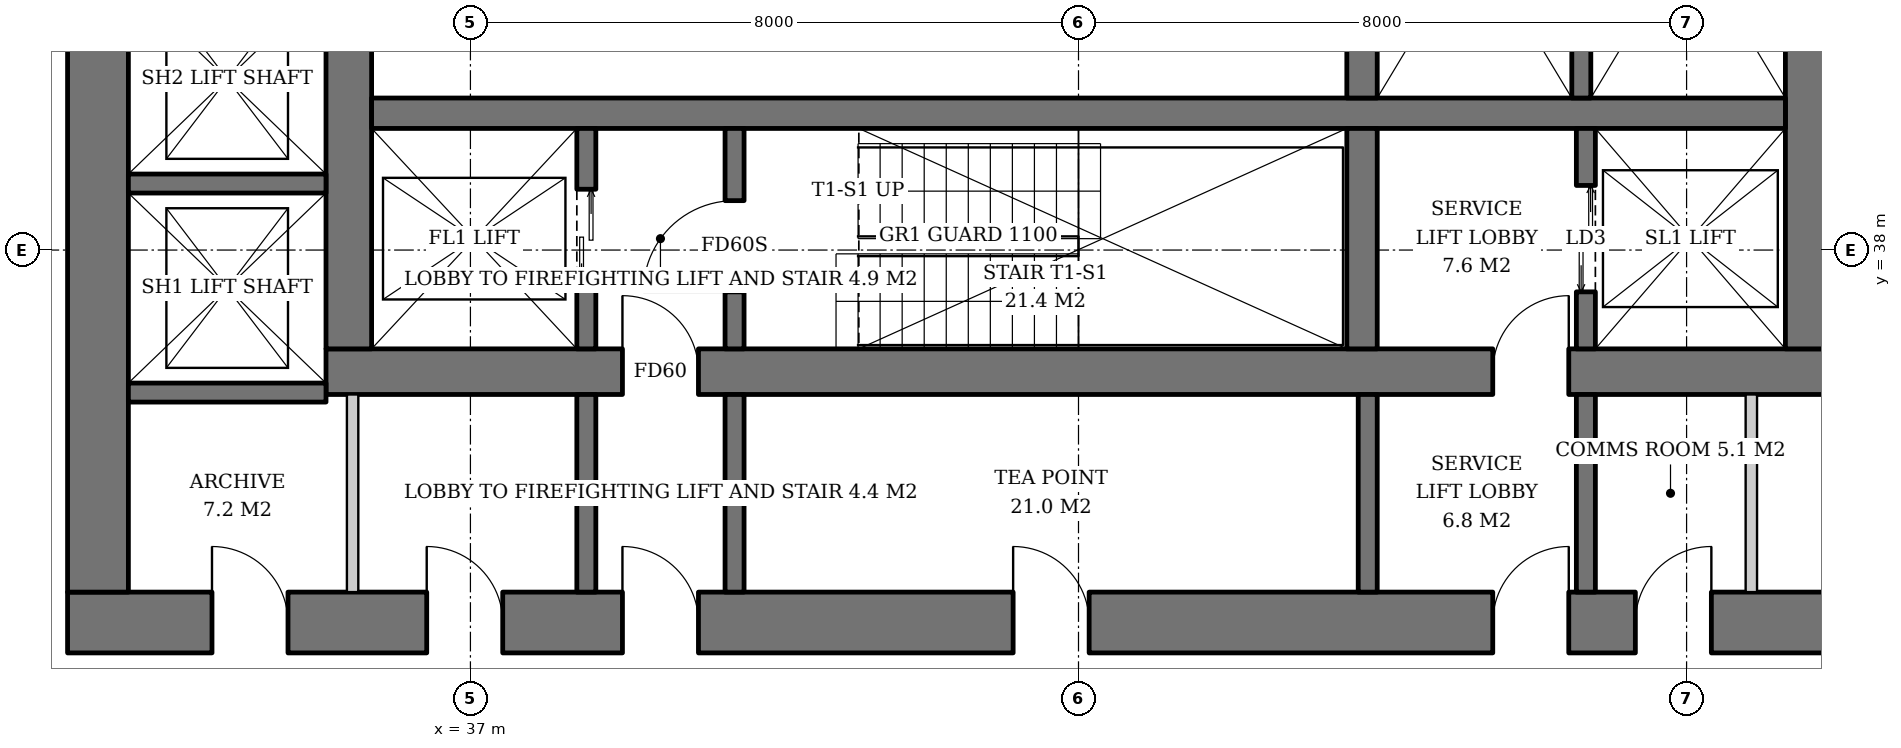
"""IFC4 building model, lengths in metres.
Left out: names, types, materials, properties, quantities, classifications, styles, units other than length and angle.
Written with IfcOpenShell. Run it as: python <this file> out.ifc"""

import sys

from ifc_helpers import new_model, si_unit, direction, frame, frame_2d, origin, place, context, subcontext, project, spatial, rectangle, extrude, element, fill, save


model = new_model("IFC4")
c1 = context("Model", 3, precision=1e-05, world=origin(), true_north=direction((0.0, 1.0)))
c2 = subcontext(c1, "Body", "Model", "MODEL_VIEW")
j1 = project(units=[si_unit("LENGTHUNIT", "METRE"), si_unit("PLANEANGLEUNIT", "RADIAN")], contexts=[c1])
p1 = place(None, origin())
s1 = spatial("IfcSite", under=j1, at=p1, CompositionType="ELEMENT")
p2 = place(p1, origin())
s2 = spatial("IfcBuilding", under=s1, at=p2, CompositionType="ELEMENT")
p3 = place(p2, frame((0.0, 0.0, 55.2)))
s3 = spatial("IfcBuildingStorey", under=s2, at=p3, CompositionType="ELEMENT", Elevation=55.2)
p4 = place(p3, frame((35.1, 36.4, 0.0), z_axis=(0.0, 0.0, 1.0), x_axis=(1.0, 0.0, 0.0)))
e1 = element("IfcWall", 1, at=p4, inside=s3, PredefinedType="SHEAR", context=c2, shape_type="SweptSolid", body=[
    extrude(rectangle(XDim=19.8, YDim=0.6, at=frame_2d((9.9, 0.0))), origin(), (0.0, 0.0, 1.0), 3.8),
])
p5 = place(p4, frame((3.9, 0.0, 0.0)))
e2 = element("IfcOpeningElement", 2, at=p5, cuts=e1, PredefinedType="OPENING", context=c2, shape_type="SweptSolid", body=[
    extrude(rectangle(XDim=1.0, YDim=2.1, at=frame_2d((0.5, 1.05))), frame((0.0, 0.31, 0.0), z_axis=(0.0, -1.0, 0.0), x_axis=(1.0, 0.0, 0.0)), (0.0, 0.0, 1.0), 0.62),
])
p6 = place(p4, frame((15.35, 0.0, 0.0)))
e3 = element("IfcOpeningElement", 3, at=p6, cuts=e1, PredefinedType="OPENING", context=c2, shape_type="SweptSolid", body=[
    extrude(rectangle(XDim=1.0, YDim=2.1, at=frame_2d((0.5, 1.05))), frame((0.0, 0.31, 0.0), z_axis=(0.0, -1.0, 0.0), x_axis=(1.0, 0.0, 0.0)), (0.0, 0.0, 1.0), 0.62),
])
p7 = place(p3, frame((35.4, 36.7, 0.0), z_axis=(0.0, 0.0, 1.0), x_axis=(0.0, 1.0, 0.0)))
e4 = element("IfcWall", 4, at=p7, inside=s3, PredefinedType="SHEAR", context=c2, shape_type="SweptSolid", body=[
    extrude(rectangle(XDim=18.6, YDim=0.6, at=frame_2d((9.3, 0.0))), origin(), (0.0, 0.0, 1.0), 3.8),
])
p8 = place(p7, frame((8.4, 0.0, 0.0)))
e5 = element("IfcOpeningElement", 5, at=p8, cuts=e4, PredefinedType="OPENING", context=c2, shape_type="SweptSolid", body=[
    extrude(rectangle(XDim=1.8, YDim=2.4, at=frame_2d((0.9, 1.2))), frame((0.0, 0.31, 0.0), z_axis=(0.0, -1.0, 0.0), x_axis=(1.0, 0.0, 0.0)), (0.0, 0.0, 1.0), 0.62),
])
p9 = place(p3, frame((54.6, 36.7, 0.0), z_axis=(0.0, 0.0, 1.0), x_axis=(0.0, 1.0, 0.0)))
e6 = element("IfcWall", 6, at=p9, inside=s3, PredefinedType="SHEAR", context=c2, shape_type="SweptSolid", body=[
    extrude(rectangle(XDim=18.6, YDim=0.6, at=frame_2d((9.3, 0.0))), origin(), (0.0, 0.0, 1.0), 3.8),
])
p10 = place(p9, frame((8.4, 0.0, 0.0)))
e7 = element("IfcOpeningElement", 7, at=p10, cuts=e6, PredefinedType="OPENING", context=c2, shape_type="SweptSolid", body=[
    extrude(rectangle(XDim=1.8, YDim=2.4, at=frame_2d((0.9, 1.2))), frame((0.0, 0.31, 0.0), z_axis=(0.0, -1.0, 0.0), x_axis=(1.0, 0.0, 0.0)), (0.0, 0.0, 1.0), 0.62),
])
p11 = place(p3, frame((31.7, 33.1, 0.0), z_axis=(0.0, 0.0, 1.0), x_axis=(1.0, 0.0, 0.0)))
e8 = element("IfcWall", 8, at=p11, inside=s3, PredefinedType="SHEAR", context=c2, shape_type="SweptSolid", body=[
    extrude(rectangle(XDim=26.6, YDim=0.8, at=frame_2d((13.3, 0.0))), origin(), (0.0, 0.0, 1.0), 3.8),
])
p12 = place(p11, frame((7.3, 0.0, 0.0)))
e9 = element("IfcOpeningElement", 9, at=p12, cuts=e8, PredefinedType="OPENING", context=c2, shape_type="SweptSolid", body=[
    extrude(rectangle(XDim=1.0, YDim=2.1, at=frame_2d((0.5, 1.05))), frame((0.0, 0.41, 0.0), z_axis=(0.0, -1.0, 0.0), x_axis=(1.0, 0.0, 0.0)), (0.0, 0.0, 1.0), 0.82),
])
p13 = place(p11, frame((18.75, 0.0, 0.0)))
e10 = element("IfcOpeningElement", 10, at=p13, cuts=e8, PredefinedType="OPENING", context=c2, shape_type="SweptSolid", body=[
    extrude(rectangle(XDim=1.0, YDim=2.1, at=frame_2d((0.5, 1.05))), frame((0.0, 0.41, 0.0), z_axis=(0.0, -1.0, 0.0), x_axis=(1.0, 0.0, 0.0)), (0.0, 0.0, 1.0), 0.82),
])
p14 = place(p11, frame((1.9, 0.0, 0.0)))
e11 = element("IfcOpeningElement", 11, at=p14, cuts=e8, PredefinedType="OPENING", context=c2, shape_type="SweptSolid", body=[
    extrude(rectangle(XDim=1.0, YDim=2.1, at=frame_2d((0.5, 1.05))), frame((0.0, 0.41, 0.0), z_axis=(0.0, -1.0, 0.0), x_axis=(1.0, 0.0, 0.0)), (0.0, 0.0, 1.0), 0.82),
])
p15 = place(p11, frame((4.725, 0.0, 0.0)))
e12 = element("IfcOpeningElement", 12, at=p15, cuts=e8, PredefinedType="OPENING", context=c2, shape_type="SweptSolid", body=[
    extrude(rectangle(XDim=1.0, YDim=2.1, at=frame_2d((0.5, 1.05))), frame((0.0, 0.41, 0.0), z_axis=(0.0, -1.0, 0.0), x_axis=(1.0, 0.0, 0.0)), (0.0, 0.0, 1.0), 0.82),
])
p16 = place(p11, frame((12.44, 0.0, 0.0)))
e13 = element("IfcOpeningElement", 13, at=p16, cuts=e8, PredefinedType="OPENING", context=c2, shape_type="SweptSolid", body=[
    extrude(rectangle(XDim=1.0, YDim=2.1, at=frame_2d((0.5, 1.05))), frame((0.0, 0.41, 0.0), z_axis=(0.0, -1.0, 0.0), x_axis=(1.0, 0.0, 0.0)), (0.0, 0.0, 1.0), 0.82),
])
p17 = place(p11, frame((20.626, 0.0, 0.0)))
e14 = element("IfcOpeningElement", 14, at=p17, cuts=e8, PredefinedType="OPENING", context=c2, shape_type="SweptSolid", body=[
    extrude(rectangle(XDim=1.0, YDim=2.1, at=frame_2d((0.5, 1.05))), frame((0.0, 0.41, 0.0), z_axis=(0.0, -1.0, 0.0), x_axis=(1.0, 0.0, 0.0)), (0.0, 0.0, 1.0), 0.82),
])
p18 = place(p11, frame((23.476, 0.0, 0.0)))
e15 = element("IfcOpeningElement", 15, at=p18, cuts=e8, PredefinedType="OPENING", context=c2, shape_type="SweptSolid", body=[
    extrude(rectangle(XDim=1.0, YDim=2.1, at=frame_2d((0.5, 1.05))), frame((0.0, 0.41, 0.0), z_axis=(0.0, -1.0, 0.0), x_axis=(1.0, 0.0, 0.0)), (0.0, 0.0, 1.0), 0.82),
])
p19 = place(p3, frame((32.1, 33.5, 0.0), z_axis=(0.0, 0.0, 1.0), x_axis=(0.0, 1.0, 0.0)))
e16 = element("IfcWall", 16, at=p19, inside=s3, PredefinedType="SHEAR", context=c2, shape_type="SweptSolid", body=[
    extrude(rectangle(XDim=25.0, YDim=0.8, at=frame_2d((12.5, 0.0))), origin(), (0.0, 0.0, 1.0), 3.8),
])
p20 = place(p19, frame((11.6, 0.0, 0.0)))
e17 = element("IfcOpeningElement", 17, at=p20, cuts=e16, PredefinedType="OPENING", context=c2, shape_type="SweptSolid", body=[
    extrude(rectangle(XDim=1.8, YDim=2.4, at=frame_2d((0.9, 1.2))), frame((0.0, 0.41, 0.0), z_axis=(0.0, -1.0, 0.0), x_axis=(1.0, 0.0, 0.0)), (0.0, 0.0, 1.0), 0.82),
])
p21 = place(p3, frame((35.7, 39.8, 0.0), z_axis=(0.0, 0.0, 1.0), x_axis=(1.0, 0.0, 0.0)))
e18 = element("IfcWall", 18, at=p21, inside=s3, PredefinedType="SHEAR", context=c2, shape_type="SweptSolid", body=[
    extrude(rectangle(XDim=18.6, YDim=0.4, at=frame_2d((9.3, 0.0))), origin(), (0.0, 0.0, 1.0), 3.8),
])
p22 = place(p3, frame((48.73, 36.7, 0.0), z_axis=(0.0, 0.0, 1.0), x_axis=(0.0, 1.0, 0.0)))
e19 = element("IfcWall", 19, at=p22, inside=s3, PredefinedType="SHEAR", context=c2, shape_type="SweptSolid", body=[
    extrude(rectangle(XDim=2.9, YDim=0.4, at=frame_2d((1.45, 0.0))), origin(), (0.0, 0.0, 1.0), 3.8),
])
p23 = place(p3, frame((48.73, 40.0, 0.0), z_axis=(0.0, 0.0, 1.0), x_axis=(0.0, 1.0, 0.0)))
e20 = element("IfcWall", 20, at=p23, inside=s3, PredefinedType="SHEAR", context=c2, shape_type="SweptSolid", body=[
    extrude(rectangle(XDim=12.0, YDim=0.4, at=frame_2d((6.0, 0.0))), origin(), (0.0, 0.0, 1.0), 3.8),
])
p24 = place(p3, frame((38.525, 36.7, 0.0), z_axis=(0.0, 0.0, 1.0), x_axis=(0.0, 1.0, 0.0)))
e21 = element("IfcWall", 21, at=p24, inside=s3, PredefinedType="SHEAR", context=c2, shape_type="SweptSolid", body=[
    extrude(rectangle(XDim=2.9, YDim=0.25, at=frame_2d((1.45, 0.0))), origin(), (0.0, 0.0, 1.0), 3.8),
])
p25 = place(p24, frame((0.8, 0.0, 0.0)))
e22 = element("IfcOpeningElement", 22, at=p25, cuts=e21, PredefinedType="OPENING", context=c2, shape_type="SweptSolid", body=[
    extrude(rectangle(XDim=1.3, YDim=2.2, at=frame_2d((0.65, 1.1))), frame((0.0, 0.135, 0.0), z_axis=(0.0, -1.0, 0.0), x_axis=(1.0, 0.0, 0.0)), (0.0, 0.0, 1.0), 0.27),
])
p26 = place(p3, frame((40.475, 36.7, 0.0), z_axis=(0.0, 0.0, 1.0), x_axis=(0.0, 1.0, 0.0)))
e23 = element("IfcWall", 23, at=p26, inside=s3, PredefinedType="SHEAR", context=c2, shape_type="SweptSolid", body=[
    extrude(rectangle(XDim=2.9, YDim=0.25, at=frame_2d((1.45, 0.0))), origin(), (0.0, 0.0, 1.0), 3.8),
])
p27 = place(p26, frame((0.75, 0.0, 0.0)))
e24 = element("IfcOpeningElement", 24, at=p27, cuts=e23, PredefinedType="OPENING", context=c2, shape_type="SweptSolid", body=[
    extrude(rectangle(XDim=1.2, YDim=2.1, at=frame_2d((0.6, 1.05))), frame((0.0, 0.135, 0.0), z_axis=(0.0, -1.0, 0.0), x_axis=(1.0, 0.0, 0.0)), (0.0, 0.0, 1.0), 0.27),
])
p28 = place(p3, frame((51.675, 36.7, 0.0), z_axis=(0.0, 0.0, 1.0), x_axis=(0.0, 1.0, 0.0)))
e25 = element("IfcWall", 25, at=p28, inside=s3, PredefinedType="SHEAR", context=c2, shape_type="SweptSolid", body=[
    extrude(rectangle(XDim=2.9, YDim=0.25, at=frame_2d((1.45, 0.0))), origin(), (0.0, 0.0, 1.0), 3.8),
])
p29 = place(p28, frame((0.75, 0.0, 0.0)))
e26 = element("IfcOpeningElement", 26, at=p29, cuts=e25, PredefinedType="OPENING", context=c2, shape_type="SweptSolid", body=[
    extrude(rectangle(XDim=1.4, YDim=2.4, at=frame_2d((0.7, 1.2))), frame((0.0, 0.135, 0.0), z_axis=(0.0, -1.0, 0.0), x_axis=(1.0, 0.0, 0.0)), (0.0, 0.0, 1.0), 0.27),
])
p30 = place(p3, frame((51.615, 44.25, 0.0), z_axis=(0.0, 0.0, 1.0), x_axis=(0.0, -1.0, 0.0)))
e27 = element("IfcWall", 27, at=p30, inside=s3, PredefinedType="SHEAR", context=c2, shape_type="SweptSolid", body=[
    extrude(rectangle(XDim=4.25, YDim=0.25, at=frame_2d((2.125, 0.0))), origin(), (0.0, 0.0, 1.0), 3.8),
])
for number, where, z_axis, x_axis in (
    (28, (32.5, 36.125, 0.0), (0.0, 0.0, 1.0), (1.0, 0.0, 0.0)),
    (29, (32.5, 38.875, 0.0), (0.0, 0.0, 1.0), (1.0, 0.0, 0.0)),
):
    element("IfcWall", number, at=place(p3, frame(where, z_axis=z_axis, x_axis=x_axis)), inside=s3, PredefinedType="SHEAR", context=c2, shape_type="SweptSolid", body=[
        extrude(rectangle(XDim=2.6, YDim=0.25, at=frame_2d((1.3, 0.0))), origin(), (0.0, 0.0, 1.0), 3.8),
    ])
for number, where, z_axis, x_axis in (
    (30, (38.525, 33.5, 0.0), (0.0, 0.0, 1.0), (0.0, 1.0, 0.0)),
    (31, (40.475, 33.5, 0.0), (0.0, 0.0, 1.0), (0.0, 1.0, 0.0)),
    (32, (48.805, 33.5, 0.0), (0.0, 0.0, 1.0), (0.0, 1.0, 0.0)),
    (33, (51.675, 33.5, 0.0), (0.0, 0.0, 1.0), (0.0, 1.0, 0.0)),
):
    element("IfcWall", number, at=place(p3, frame(where, z_axis=z_axis, x_axis=x_axis)), inside=s3, PredefinedType="SOLIDWALL", context=c2, shape_type="SweptSolid", body=[
        extrude(rectangle(XDim=2.6, YDim=0.25, at=frame_2d((1.3, 0.0))), origin(), (0.0, 0.0, 1.0), 3.62),
    ])
for number, where, z_axis, x_axis in (
    (34, (35.45, 33.5, 0.0), (0.0, 0.0, 1.0), (0.0, 1.0, 0.0)),
    (35, (53.852, 33.5, 0.0), (0.0, 0.0, 1.0), (0.0, 1.0, 0.0)),
):
    element("IfcWall", number, at=place(p3, frame(where, z_axis=z_axis, x_axis=x_axis)), inside=s3, PredefinedType="SOLIDWALL", context=c2, shape_type="SweptSolid", body=[
        extrude(rectangle(XDim=2.6, YDim=0.15, at=frame_2d((1.3, 0.0))), origin(), (0.0, 0.0, 1.0), 3.62),
    ])
p31 = place(p25, origin())
e36 = element("IfcDoor", 36, at=p31, inside=s3, OperationType="DOUBLE_DOOR_SLIDING", PredefinedType="DOOR", context=c2, shape_type="SweptSolid", body=[
    extrude(rectangle(XDim=1.3, YDim=2.2, at=frame_2d((0.65, 1.1))), frame((0.0, 0.025, 0.0), z_axis=(0.0, -1.0, 0.0), x_axis=(1.0, 0.0, 0.0)), (0.0, 0.0, 1.0), 0.05),
])
fill(e22, e36)
p32 = place(p27, origin())
e37 = element("IfcDoor", 37, at=p32, inside=s3, OperationType="SINGLE_SWING_LEFT", PredefinedType="DOOR", context=c2, shape_type="SweptSolid", body=[
    extrude(rectangle(XDim=1.2, YDim=2.1, at=frame_2d((0.6, 1.05))), frame((0.0, 0.025, 0.0), z_axis=(0.0, -1.0, 0.0), x_axis=(1.0, 0.0, 0.0)), (0.0, 0.0, 1.0), 0.05),
])
fill(e24, e37)
p33 = place(p29, origin())
e38 = element("IfcDoor", 38, at=p33, inside=s3, OperationType="DOUBLE_DOOR_SLIDING", PredefinedType="DOOR", context=c2, shape_type="SweptSolid", body=[
    extrude(rectangle(XDim=1.4, YDim=2.4, at=frame_2d((0.7, 1.2))), frame((0.0, 0.025, 0.0), z_axis=(0.0, -1.0, 0.0), x_axis=(1.0, 0.0, 0.0)), (0.0, 0.0, 1.0), 0.05),
])
fill(e26, e38)
p34 = place(p5, origin())
e39 = element("IfcDoor", 39, at=p34, inside=s3, OperationType="SINGLE_SWING_LEFT", PredefinedType="DOOR", context=c2, shape_type="SweptSolid", body=[
    extrude(rectangle(XDim=1.0, YDim=2.1, at=frame_2d((0.5, 1.05))), frame((0.0, 0.025, 0.0), z_axis=(0.0, -1.0, 0.0), x_axis=(1.0, 0.0, 0.0)), (0.0, 0.0, 1.0), 0.05),
])
fill(e2, e39)
p35 = place(p6, origin())
e40 = element("IfcDoor", 40, at=p35, inside=s3, OperationType="SINGLE_SWING_RIGHT", PredefinedType="DOOR", context=c2, shape_type="SweptSolid", body=[
    extrude(rectangle(XDim=1.0, YDim=2.1, at=frame_2d((0.5, 1.05))), frame((0.0, 0.025, 0.0), z_axis=(0.0, -1.0, 0.0), x_axis=(1.0, 0.0, 0.0)), (0.0, 0.0, 1.0), 0.05),
])
fill(e3, e40)
p36 = place(p12, origin())
e41 = element("IfcDoor", 41, at=p36, inside=s3, OperationType="SINGLE_SWING_LEFT", PredefinedType="DOOR", context=c2, shape_type="SweptSolid", body=[
    extrude(rectangle(XDim=1.0, YDim=2.1, at=frame_2d((0.5, 1.05))), frame((0.0, 0.025, 0.0), z_axis=(0.0, -1.0, 0.0), x_axis=(1.0, 0.0, 0.0)), (0.0, 0.0, 1.0), 0.05),
])
fill(e9, e41)
p37 = place(p13, origin())
e42 = element("IfcDoor", 42, at=p37, inside=s3, OperationType="SINGLE_SWING_RIGHT", PredefinedType="DOOR", context=c2, shape_type="SweptSolid", body=[
    extrude(rectangle(XDim=1.0, YDim=2.1, at=frame_2d((0.5, 1.05))), frame((0.0, 0.025, 0.0), z_axis=(0.0, -1.0, 0.0), x_axis=(1.0, 0.0, 0.0)), (0.0, 0.0, 1.0), 0.05),
])
fill(e10, e42)
p38 = place(p14, origin())
e43 = element("IfcDoor", 43, at=p38, inside=s3, OperationType="SINGLE_SWING_LEFT", PredefinedType="DOOR", context=c2, shape_type="SweptSolid", body=[
    extrude(rectangle(XDim=1.0, YDim=2.1, at=frame_2d((0.5, 1.05))), frame((0.0, 0.39, 0.0), z_axis=(0.0, -1.0, 0.0), x_axis=(1.0, 0.0, 0.0)), (0.0, 0.0, 1.0), 0.05),
])
fill(e11, e43)
p39 = place(p15, origin())
e44 = element("IfcDoor", 44, at=p39, inside=s3, OperationType="SINGLE_SWING_LEFT", PredefinedType="DOOR", context=c2, shape_type="SweptSolid", body=[
    extrude(rectangle(XDim=1.0, YDim=2.1, at=frame_2d((0.5, 1.05))), frame((0.0, 0.39, 0.0), z_axis=(0.0, -1.0, 0.0), x_axis=(1.0, 0.0, 0.0)), (0.0, 0.0, 1.0), 0.05),
])
fill(e12, e44)
p40 = place(p16, origin())
e45 = element("IfcDoor", 45, at=p40, inside=s3, OperationType="SINGLE_SWING_LEFT", PredefinedType="DOOR", context=c2, shape_type="SweptSolid", body=[
    extrude(rectangle(XDim=1.0, YDim=2.1, at=frame_2d((0.5, 1.05))), frame((0.0, 0.39, 0.0), z_axis=(0.0, -1.0, 0.0), x_axis=(1.0, 0.0, 0.0)), (0.0, 0.0, 1.0), 0.05),
])
fill(e13, e45)
p41 = place(p17, origin())
e46 = element("IfcDoor", 46, at=p41, inside=s3, OperationType="SINGLE_SWING_RIGHT", PredefinedType="DOOR", context=c2, shape_type="SweptSolid", body=[
    extrude(rectangle(XDim=1.0, YDim=2.1, at=frame_2d((0.5, 1.05))), frame((0.0, 0.39, 0.0), z_axis=(0.0, -1.0, 0.0), x_axis=(1.0, 0.0, 0.0)), (0.0, 0.0, 1.0), 0.05),
])
fill(e14, e46)
save(model, sys.argv[1])
